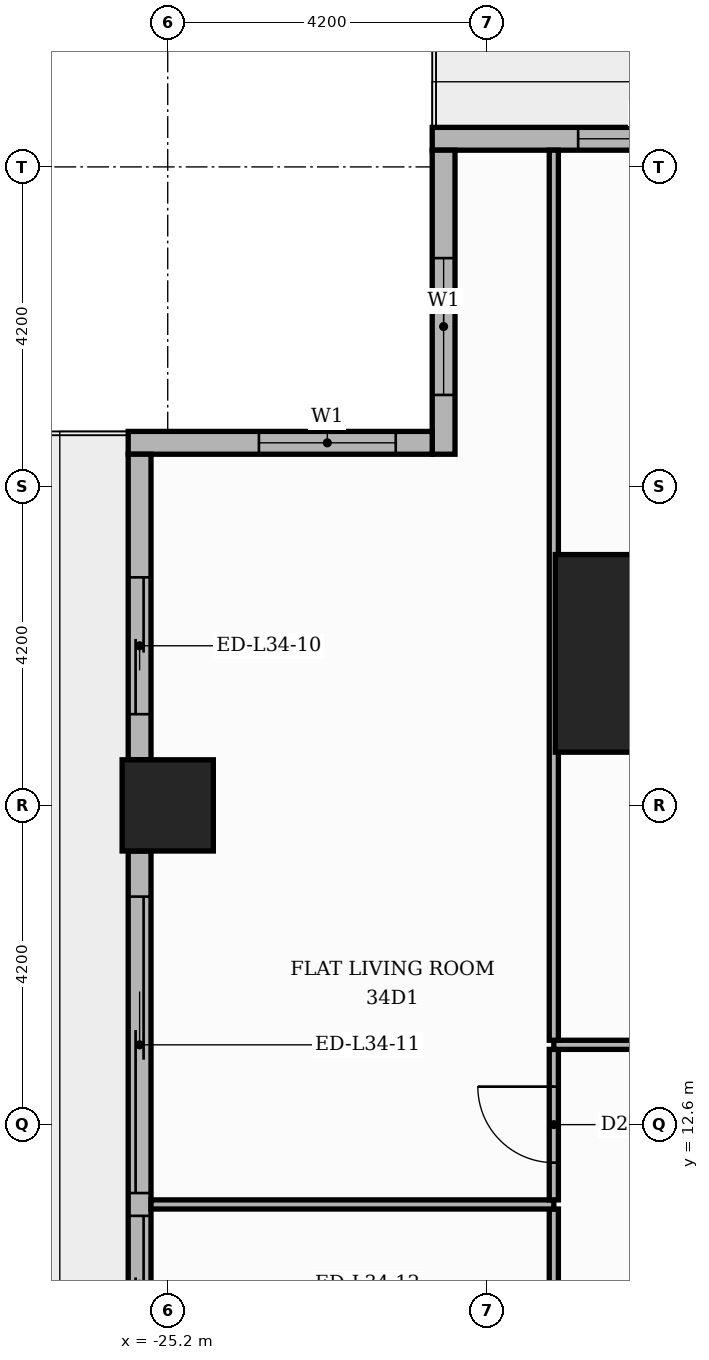
"""IFC4 building model, lengths in metres.
Left out: names, types, materials, properties, quantities, classifications, styles, units other than length and angle.
Written with IfcOpenShell. Run it as: python <this file> out.ifc"""

import sys

from ifc_helpers import new_model, si_unit, direction, frame, frame_2d, origin, origin_2d, place, context, subcontext, project, spatial, rectangle, extrude, element, fill, save


model = new_model("IFC4")
c1 = context("Model", 3, precision=1e-05, world=origin(), true_north=direction((0.0, 1.0)))
c2 = subcontext(c1, "Body", "Model", "MODEL_VIEW")
j1 = project(units=[si_unit("LENGTHUNIT", "METRE"), si_unit("PLANEANGLEUNIT", "RADIAN")], contexts=[c1])
p1 = place(None, origin())
s1 = spatial("IfcSite", under=j1, at=p1, CompositionType="ELEMENT")
p2 = place(p1, origin())
s2 = spatial("IfcBuilding", under=s1, at=p2, CompositionType="ELEMENT")
p3 = place(p2, frame((0.0, 0.0, 145.5)))
s3 = spatial("IfcBuildingStorey", under=s2, at=p3, CompositionType="ELEMENT", Elevation=145.5)
p4 = place(p3, frame((-18.8, 18.8, 0.0), z_axis=(0.0, 0.0, 1.0), x_axis=(1.0, 0.0, 0.0)))
e1 = element("IfcColumn", 1, at=p4, inside=s3, PredefinedType="COLUMN", context=c2, shape_type="SweptSolid", body=[
    extrude(rectangle(XDim=2.6, YDim=2.6, at=origin_2d()), origin(), (0.0, 0.0, 1.0), 3.9),
])
p5 = place(p3, frame((-25.2, 16.8, 0.0), z_axis=(0.0, 0.0, 1.0), x_axis=(1.0, 0.0, 0.0)))
e2 = element("IfcColumn", 2, at=p5, inside=s3, PredefinedType="COLUMN", context=c2, shape_type="SweptSolid", body=[
    extrude(rectangle(XDim=1.2, YDim=1.2, at=origin_2d()), origin(), (0.0, 0.0, 1.0), 3.9),
])
p6 = place(p3, frame((-17.4, 25.57, 0.0), z_axis=(0.0, 0.0, 1.0), x_axis=(-1.0, 0.0, 0.0)))
e3 = element("IfcWall", 3, at=p6, inside=s3, PredefinedType="STANDARD", context=c2, shape_type="SweptSolid", body=[
    extrude(rectangle(XDim=4.32, YDim=0.3, at=frame_2d((2.16, 0.0))), origin(), (0.0, 0.0, 1.0), 3.48),
])
p7 = place(p6, frame((0.6, 0.0, 0.9)))
e4 = element("IfcOpeningElement", 4, at=p7, cuts=e3, PredefinedType="OPENING", context=c2, shape_type="SweptSolid", body=[
    extrude(rectangle(XDim=1.8, YDim=2.1, at=frame_2d((0.9, 1.05))), frame((0.0, 0.16, 0.0), z_axis=(0.0, -1.0, 0.0), x_axis=(1.0, 0.0, 0.0)), (0.0, 0.0, 1.0), 0.32),
])
p8 = place(p3, frame((-21.57, 25.42, 0.0), z_axis=(0.0, 0.0, 1.0), x_axis=(0.0, -1.0, 0.0)))
e5 = element("IfcWall", 5, at=p8, inside=s3, PredefinedType="STANDARD", context=c2, shape_type="SweptSolid", body=[
    extrude(rectangle(XDim=4.0, YDim=0.3, at=frame_2d((2.0, 0.0))), origin(), (0.0, 0.0, 1.0), 3.48),
])
p9 = place(p8, frame((1.42, 0.0, 0.9)))
e6 = element("IfcOpeningElement", 6, at=p9, cuts=e5, PredefinedType="OPENING", context=c2, shape_type="SweptSolid", body=[
    extrude(rectangle(XDim=1.8, YDim=2.1, at=frame_2d((0.9, 1.05))), frame((0.0, 0.16, 0.0), z_axis=(0.0, -1.0, 0.0), x_axis=(1.0, 0.0, 0.0)), (0.0, 0.0, 1.0), 0.32),
])
p10 = place(p3, frame((-21.72, 21.57, 0.0), z_axis=(0.0, 0.0, 1.0), x_axis=(-1.0, 0.0, 0.0)))
e7 = element("IfcWall", 7, at=p10, inside=s3, PredefinedType="STANDARD", context=c2, shape_type="SweptSolid", body=[
    extrude(rectangle(XDim=4.0, YDim=0.3, at=frame_2d((2.0, 0.0))), origin(), (0.0, 0.0, 1.0), 3.48),
])
p11 = place(p10, frame((0.48, 0.0, 0.9)))
e8 = element("IfcOpeningElement", 8, at=p11, cuts=e7, PredefinedType="OPENING", context=c2, shape_type="SweptSolid", body=[
    extrude(rectangle(XDim=1.8, YDim=2.1, at=frame_2d((0.9, 1.05))), frame((0.0, 0.16, 0.0), z_axis=(0.0, -1.0, 0.0), x_axis=(1.0, 0.0, 0.0)), (0.0, 0.0, 1.0), 0.32),
])
p12 = place(p3, frame((-25.57, 21.42, 0.0), z_axis=(0.0, 0.0, 1.0), x_axis=(0.0, -1.0, 0.0)))
e9 = element("IfcWall", 9, at=p12, inside=s3, PredefinedType="STANDARD", context=c2, shape_type="SweptSolid", body=[
    extrude(rectangle(XDim=4.02, YDim=0.3, at=frame_2d((2.01, 0.0))), origin(), (0.0, 0.0, 1.0), 3.48),
])
p13 = place(p12, frame((1.62, 0.0, 0.0)))
e10 = element("IfcOpeningElement", 10, at=p13, cuts=e9, PredefinedType="OPENING", context=c2, shape_type="SweptSolid", body=[
    extrude(rectangle(XDim=1.8, YDim=2.4, at=frame_2d((0.9, 1.2))), frame((0.0, 0.16, 0.0), z_axis=(0.0, -1.0, 0.0), x_axis=(1.0, 0.0, 0.0)), (0.0, 0.0, 1.0), 0.32),
])
p14 = place(p3, frame((-25.57, 16.2, 0.0), z_axis=(0.0, 0.0, 1.0), x_axis=(0.0, -1.0, 0.0)))
e11 = element("IfcWall", 11, at=p14, inside=s3, PredefinedType="STANDARD", context=c2, shape_type="SweptSolid", body=[
    extrude(rectangle(XDim=7.2, YDim=0.3, at=frame_2d((3.6, 0.0))), origin(), (0.0, 0.0, 1.0), 3.48),
])
p15 = place(p14, frame((0.6, 0.0, 0.0)))
e12 = element("IfcOpeningElement", 12, at=p15, cuts=e11, PredefinedType="OPENING", context=c2, shape_type="SweptSolid", body=[
    extrude(rectangle(XDim=3.9, YDim=2.4, at=frame_2d((1.95, 1.2))), frame((0.0, 0.16, 0.0), z_axis=(0.0, -1.0, 0.0), x_axis=(1.0, 0.0, 0.0)), (0.0, 0.0, 1.0), 0.32),
])
p16 = place(p14, frame((4.8, 0.0, 0.0)))
e13 = element("IfcOpeningElement", 13, at=p16, cuts=e11, PredefinedType="OPENING", context=c2, shape_type="SweptSolid", body=[
    extrude(rectangle(XDim=1.8, YDim=2.4, at=frame_2d((0.9, 1.2))), frame((0.0, 0.16, 0.0), z_axis=(0.0, -1.0, 0.0), x_axis=(1.0, 0.0, 0.0)), (0.0, 0.0, 1.0), 0.32),
])
p17 = place(p3, frame((-20.12, 3.21, 0.0), z_axis=(0.0, 0.0, 1.0), x_axis=(0.0, 1.0, 0.0)))
e14 = element("IfcWall", 14, at=p17, inside=s3, PredefinedType="PARTITIONING", context=c2, shape_type="SweptSolid", body=[
    extrude(rectangle(XDim=8.28, YDim=0.12, at=frame_2d((4.14, 0.0))), origin(), (0.0, 0.0, 1.0), 3.48),
])
p18 = place(p17, frame((3.69, 0.0, 0.0)))
e15 = element("IfcOpeningElement", 15, at=p18, cuts=e14, PredefinedType="OPENING", context=c2, shape_type="SweptSolid", body=[
    extrude(rectangle(XDim=0.9, YDim=2.1, at=frame_2d((0.45, 1.05))), frame((0.0, 0.07, 0.0), z_axis=(0.0, -1.0, 0.0), x_axis=(1.0, 0.0, 0.0)), (0.0, 0.0, 1.0), 0.14),
])
p19 = place(p3, frame((-25.42, 11.55, 0.0), z_axis=(0.0, 0.0, 1.0), x_axis=(1.0, 0.0, 0.0)))
e16 = element("IfcWall", 16, at=p19, inside=s3, PredefinedType="PARTITIONING", context=c2, shape_type="SweptSolid", body=[
    extrude(rectangle(XDim=5.3, YDim=0.12, at=frame_2d((2.65, 0.0))), origin(), (0.0, 0.0, 1.0), 3.48),
])
p20 = place(p3, frame((-20.12, 11.61, 0.0), z_axis=(0.0, 0.0, 1.0), x_axis=(0.0, 1.0, 0.0)))
e17 = element("IfcWall", 17, at=p20, inside=s3, PredefinedType="PARTITIONING", context=c2, shape_type="SweptSolid", body=[
    extrude(rectangle(XDim=1.98, YDim=0.12, at=frame_2d((0.99, 0.0))), origin(), (0.0, 0.0, 1.0), 3.48),
])
p21 = place(p20, frame((0.49, 0.0, 0.0)))
e18 = element("IfcOpeningElement", 18, at=p21, cuts=e17, PredefinedType="OPENING", context=c2, shape_type="SweptSolid", body=[
    extrude(rectangle(XDim=1.0, YDim=2.1, at=frame_2d((0.5, 1.05))), frame((0.0, 0.07, 0.0), z_axis=(0.0, -1.0, 0.0), x_axis=(1.0, 0.0, 0.0)), (0.0, 0.0, 1.0), 0.14),
])
p22 = place(p3, frame((-20.12, 13.65, 0.0), z_axis=(0.0, 0.0, 1.0), x_axis=(1.0, 0.0, 0.0)))
e19 = element("IfcWall", 19, at=p22, inside=s3, PredefinedType="PARTITIONING", context=c2, shape_type="SweptSolid", body=[
    extrude(rectangle(XDim=6.47, YDim=0.12, at=frame_2d((3.235, 0.0))), origin(), (0.0, 0.0, 1.0), 3.48),
])
p23 = place(p22, frame((2.785, 0.0, 0.0)))
e20 = element("IfcOpeningElement", 20, at=p23, cuts=e19, PredefinedType="OPENING", context=c2, shape_type="SweptSolid", body=[
    extrude(rectangle(XDim=0.9, YDim=2.1, at=frame_2d((0.45, 1.05))), frame((0.0, 0.07, 0.0), z_axis=(0.0, -1.0, 0.0), x_axis=(1.0, 0.0, 0.0)), (0.0, 0.0, 1.0), 0.14),
])
p24 = place(p3, frame((-20.12, 13.71, 0.0), z_axis=(0.0, 0.0, 1.0), x_axis=(0.0, 1.0, 0.0)))
e21 = element("IfcWall", 21, at=p24, inside=s3, PredefinedType="PARTITIONING", context=c2, shape_type="SweptSolid", body=[
    extrude(rectangle(XDim=11.71, YDim=0.12, at=frame_2d((5.855, 0.0))), origin(), (0.0, 0.0, 1.0), 3.48),
])
p25 = place(p7, origin())
e22 = element("IfcWindow", 22, at=p25, inside=s3, PartitioningType="SINGLE_PANEL", PredefinedType="WINDOW", context=c2, shape_type="SweptSolid", body=[
    extrude(rectangle(XDim=1.8, YDim=2.1, at=frame_2d((0.9, 1.05))), frame((0.0, 0.03, 0.0), z_axis=(0.0, -1.0, 0.0), x_axis=(1.0, 0.0, 0.0)), (0.0, 0.0, 1.0), 0.06),
])
fill(e4, e22)
p26 = place(p9, origin())
e23 = element("IfcWindow", 23, at=p26, inside=s3, PartitioningType="SINGLE_PANEL", PredefinedType="WINDOW", context=c2, shape_type="SweptSolid", body=[
    extrude(rectangle(XDim=1.8, YDim=2.1, at=frame_2d((0.9, 1.05))), frame((0.0, 0.03, 0.0), z_axis=(0.0, -1.0, 0.0), x_axis=(1.0, 0.0, 0.0)), (0.0, 0.0, 1.0), 0.06),
])
fill(e6, e23)
p27 = place(p11, origin())
e24 = element("IfcWindow", 24, at=p27, inside=s3, PartitioningType="SINGLE_PANEL", PredefinedType="WINDOW", context=c2, shape_type="SweptSolid", body=[
    extrude(rectangle(XDim=1.8, YDim=2.1, at=frame_2d((0.9, 1.05))), frame((0.0, 0.03, 0.0), z_axis=(0.0, -1.0, 0.0), x_axis=(1.0, 0.0, 0.0)), (0.0, 0.0, 1.0), 0.06),
])
fill(e8, e24)
p28 = place(p13, origin())
e25 = element("IfcDoor", 25, at=p28, inside=s3, OperationType="SLIDING_TO_RIGHT", PredefinedType="DOOR", context=c2, shape_type="SweptSolid", body=[
    extrude(rectangle(XDim=1.8, YDim=2.4, at=frame_2d((0.9, 1.2))), frame((0.0, 0.025, 0.0), z_axis=(0.0, -1.0, 0.0), x_axis=(1.0, 0.0, 0.0)), (0.0, 0.0, 1.0), 0.05),
])
fill(e10, e25)
p29 = place(p15, origin())
e26 = element("IfcDoor", 26, at=p29, inside=s3, OperationType="SLIDING_TO_LEFT", PredefinedType="DOOR", context=c2, shape_type="SweptSolid", body=[
    extrude(rectangle(XDim=3.9, YDim=2.4, at=frame_2d((1.95, 1.2))), frame((0.0, 0.025, 0.0), z_axis=(0.0, -1.0, 0.0), x_axis=(1.0, 0.0, 0.0)), (0.0, 0.0, 1.0), 0.05),
])
fill(e12, e26)
p30 = place(p16, origin())
e27 = element("IfcDoor", 27, at=p30, inside=s3, OperationType="SLIDING_TO_RIGHT", PredefinedType="DOOR", context=c2, shape_type="SweptSolid", body=[
    extrude(rectangle(XDim=1.8, YDim=2.4, at=frame_2d((0.9, 1.2))), frame((0.0, 0.025, 0.0), z_axis=(0.0, -1.0, 0.0), x_axis=(1.0, 0.0, 0.0)), (0.0, 0.0, 1.0), 0.05),
])
fill(e13, e27)
p31 = place(p21, origin())
e28 = element("IfcDoor", 28, at=p31, inside=s3, OperationType="SINGLE_SWING_RIGHT", PredefinedType="DOOR", context=c2, shape_type="SweptSolid", body=[
    extrude(rectangle(XDim=1.0, YDim=2.1, at=frame_2d((0.5, 1.05))), frame((0.0, 0.025, 0.0), z_axis=(0.0, -1.0, 0.0), x_axis=(1.0, 0.0, 0.0)), (0.0, 0.0, 1.0), 0.05),
])
fill(e18, e28)
save(model, sys.argv[1])
